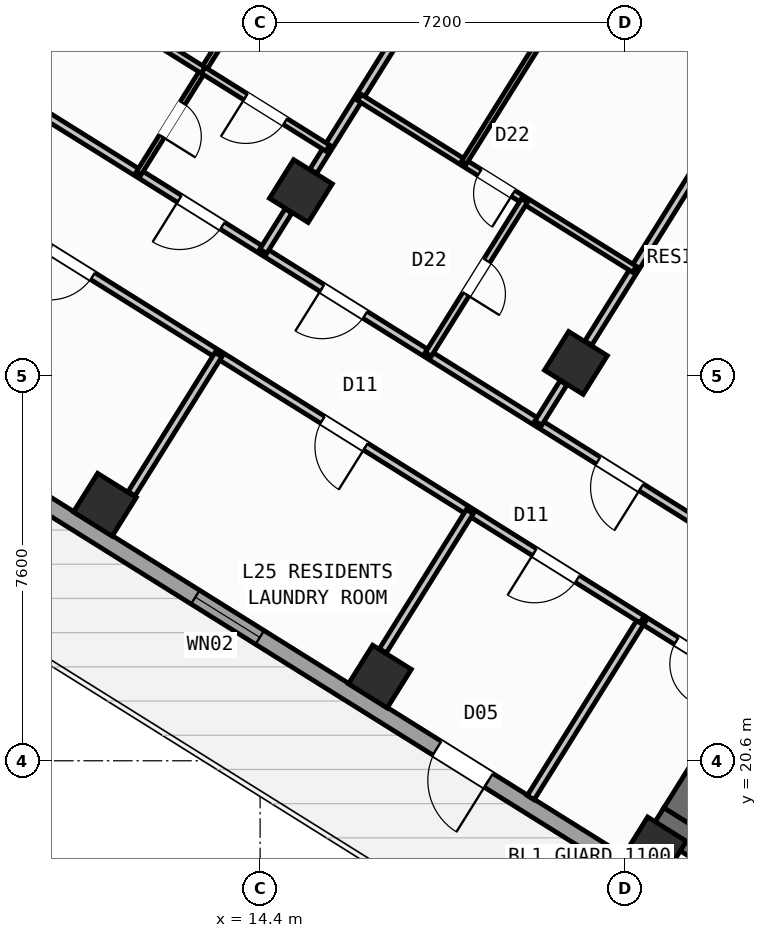
"""IFC4 building model, lengths in metres.
Left out: names, types, materials, properties, quantities, classifications, styles, units other than length and angle.
Written with IfcOpenShell. Run it as: python <this file> out.ifc"""

import sys

from ifc_helpers import new_model, si_unit, direction, frame, frame_2d, origin, origin_2d, place, context, subcontext, project, spatial, rectangle, hollow_rectangle, extrude, source, transform, mapped, element, fill, save


model = new_model("IFC4")
c1 = context("Model", 3, precision=1e-05, world=origin(), true_north=direction((0.0, 1.0)))
c2 = subcontext(c1, "Body", "Model", "MODEL_VIEW")
j1 = project(units=[si_unit("LENGTHUNIT", "METRE"), si_unit("PLANEANGLEUNIT", "RADIAN")], contexts=[c1])
p1 = place(None, origin())
s1 = spatial("IfcSite", under=j1, at=p1, CompositionType="ELEMENT")
p2 = place(p1, origin())
s2 = spatial("IfcBuilding", under=s1, at=p2, CompositionType="ELEMENT")
p3 = place(p2, frame((0.0, 0.0, 100.8)))
s3 = spatial("IfcBuildingStorey", under=s2, at=p3, CompositionType="ELEMENT", Elevation=100.8)
p4 = place(p3, frame((33.366, 12.477, 0.0), z_axis=(0.0, 0.0, 1.0), x_axis=(-0.848047359947, 0.529920442413, 0.0)))
e1 = element("IfcWall", 1, at=p4, inside=s3, PredefinedType="SHEAR", context=c2, shape_type="SweptSolid", body=[
    extrude(rectangle(XDim=13.14, YDim=0.55, at=frame_2d((6.57, 0.0))), origin(), (0.0, 0.0, 1.0), 4.25),
])
p5 = place(p3, frame((26.007, 24.976, 0.0), z_axis=(0.0, 0.0, 1.0), x_axis=(-0.529923795287, -0.848045264823, 0.0)))
e2 = element("IfcWall", 2, at=p5, inside=s3, PredefinedType="SHEAR", context=c2, shape_type="SweptSolid", body=[
    extrude(rectangle(XDim=6.425, YDim=0.55, at=frame_2d((3.212, 0.0))), origin(), (0.0, 0.0, 1.0), 4.25),
])
m1 = source(origin(), c2, "Body", "SweptSolid", [
    extrude(hollow_rectangle(XDim=0.9, YDim=0.9, WallThickness=0.036, at=origin_2d()), origin(), (0.0, 0.0, 1.0), 4.5),
])
for number, where, z_axis, x_axis in (
    (3, (22.191, 18.87, 0.0), (0.0, 0.0, 1.0), (-0.848, 0.53, 0.0)),
    (4, (20.632, 28.452, 0.0), (0.0, 0.0, 1.0), (-0.848, 0.53, 0.0)),
    (5, (16.764, 22.261, 0.0), (0.0, 0.0, 1.0), (-0.848, 0.53, 0.0)),
    (6, (15.205, 31.844, 0.0), (0.0, 0.0, 1.0), (-0.848, 0.53, 0.0)),
    (7, (11.336, 25.653, 0.0), (0.0, 0.0, 1.0), (-0.848, 0.53, 0.0)),
):
    element("IfcColumn", number, at=place(p3, frame(where, z_axis=z_axis, x_axis=x_axis)), inside=s3, PredefinedType="COLUMN", context=c2, shape_type="MappedRepresentation", body=[
        mapped(m1, transform((0.0, 0.0, 0.0), scale=1.0)),
    ])
p6 = place(p3, frame((31.76, 12.183, 0.0), z_axis=(0.0, 0.0, 1.0), x_axis=(-0.848047074256, 0.529920899612, 0.0)))
e8 = element("IfcWall", 8, at=p6, inside=s3, PredefinedType="STANDARD", context=c2, shape_type="SweptSolid", body=[
    extrude(rectangle(XDim=30.652, YDim=0.32, at=frame_2d((15.326, 0.0))), origin(), (0.0, 0.0, 1.0), 4.25),
])
p7 = place(p6, frame((15.153, 0.0, 0.0)))
e9 = element("IfcOpeningElement", 9, at=p7, cuts=e8, PredefinedType="OPENING", context=c2, shape_type="SweptSolid", body=[
    extrude(rectangle(XDim=1.2, YDim=2.15, at=frame_2d((0.6, 1.075))), frame((0.0, 0.17, 0.0), z_axis=(0.0, -1.0, 0.0), x_axis=(1.0, 0.0, 0.0)), (0.0, 0.0, 1.0), 0.34),
])
p8 = place(p6, frame((1.652, 0.0, 0.65)))
e10 = element("IfcOpeningElement", 10, at=p8, cuts=e8, PredefinedType="OPENING", context=c2, shape_type="SweptSolid", body=[
    extrude(rectangle(XDim=2.8, YDim=2.1, at=frame_2d((1.4, 1.05))), frame((0.0, 0.17, 0.0), z_axis=(0.0, -1.0, 0.0), x_axis=(1.0, 0.0, 0.0)), (0.0, 0.0, 1.0), 0.34),
])
p9 = place(p6, frame((6.856, 0.0, 0.65)))
e11 = element("IfcOpeningElement", 11, at=p9, cuts=e8, PredefinedType="OPENING", context=c2, shape_type="SweptSolid", body=[
    extrude(rectangle(XDim=2.8, YDim=2.1, at=frame_2d((1.4, 1.05))), frame((0.0, 0.17, 0.0), z_axis=(0.0, -1.0, 0.0), x_axis=(1.0, 0.0, 0.0)), (0.0, 0.0, 1.0), 0.34),
])
p10 = place(p6, frame((20.478, 0.0, 0.85)))
e12 = element("IfcOpeningElement", 12, at=p10, cuts=e8, PredefinedType="OPENING", context=c2, shape_type="SweptSolid", body=[
    extrude(rectangle(XDim=1.5, YDim=1.5, at=frame_2d((0.75, 0.75))), frame((0.0, 0.17, 0.0), z_axis=(0.0, -1.0, 0.0), x_axis=(1.0, 0.0, 0.0)), (0.0, 0.0, 1.0), 0.34),
])
p11 = place(p6, frame((26.258, 0.0, 0.65)))
e13 = element("IfcOpeningElement", 13, at=p11, cuts=e8, PredefinedType="OPENING", context=c2, shape_type="SweptSolid", body=[
    extrude(rectangle(XDim=2.8, YDim=2.1, at=frame_2d((1.4, 1.05))), frame((0.0, 0.17, 0.0), z_axis=(0.0, -1.0, 0.0), x_axis=(1.0, 0.0, 0.0)), (0.0, 0.0, 1.0), 0.34),
])
p12 = place(p3, frame((5.7, 28.71, 0.0), z_axis=(0.0, 0.0, 1.0), x_axis=(0.529923711467, 0.8480453172, 0.0)))
e14 = element("IfcWall", 14, at=p12, inside=s3, PredefinedType="STANDARD", context=c2, shape_type="SweptSolid", body=[
    extrude(rectangle(XDim=21.587, YDim=0.32, at=frame_2d((10.794, 0.0))), origin(), (0.0, 0.0, 1.0), 3.675),
])
p13 = place(p12, frame((1.629, 0.0, 0.85)))
e15 = element("IfcOpeningElement", 15, at=p13, cuts=e14, PredefinedType="OPENING", context=c2, shape_type="SweptSolid", body=[
    extrude(rectangle(XDim=1.5, YDim=1.5, at=frame_2d((0.75, 0.75))), frame((0.0, 0.17, 0.0), z_axis=(0.0, -1.0, 0.0), x_axis=(1.0, 0.0, 0.0)), (0.0, 0.0, 1.0), 0.34),
])
p14 = place(p12, frame((10.654, 0.0, 0.8)))
e16 = element("IfcOpeningElement", 16, at=p14, cuts=e14, PredefinedType="OPENING", context=c2, shape_type="SweptSolid", body=[
    extrude(rectangle(XDim=2.1, YDim=1.55, at=frame_2d((1.05, 0.775))), frame((0.0, 0.17, 0.0), z_axis=(0.0, -1.0, 0.0), x_axis=(1.0, 0.0, 0.0)), (0.0, 0.0, 1.0), 0.34),
])
p15 = place(p12, frame((17.803, 0.0, 0.85)))
e17 = element("IfcOpeningElement", 17, at=p15, cuts=e14, PredefinedType="OPENING", context=c2, shape_type="SweptSolid", body=[
    extrude(rectangle(XDim=1.5, YDim=1.5, at=frame_2d((0.75, 0.75))), frame((0.0, 0.17, 0.0), z_axis=(0.0, -1.0, 0.0), x_axis=(1.0, 0.0, 0.0)), (0.0, 0.0, 1.0), 0.34),
])
p16 = place(p3, frame((17.424, 47.083, 0.0), z_axis=(0.0, 0.0, 1.0), x_axis=(0.848049927979, -0.529916332693, 0.0)))
e18 = element("IfcWall", 18, at=p16, inside=s3, PredefinedType="STANDARD", context=c2, shape_type="SweptSolid", body=[
    extrude(rectangle(XDim=29.223, YDim=0.32, at=frame_2d((14.612, 0.0))), origin(), (0.0, 0.0, 1.0), 4.25),
])
p17 = place(p16, frame((10.072, 0.0, 0.0)))
e19 = element("IfcOpeningElement", 19, at=p17, cuts=e18, PredefinedType="OPENING", context=c2, shape_type="SweptSolid", body=[
    extrude(rectangle(XDim=1.05, YDim=2.15, at=frame_2d((0.525, 1.075))), frame((0.0, 0.17, 0.0), z_axis=(0.0, -1.0, 0.0), x_axis=(1.0, 0.0, 0.0)), (0.0, 0.0, 1.0), 0.34),
])
p18 = place(p16, frame((0.869, 0.0, 0.85)))
e20 = element("IfcOpeningElement", 20, at=p18, cuts=e18, PredefinedType="OPENING", context=c2, shape_type="SweptSolid", body=[
    extrude(rectangle(XDim=1.5, YDim=1.5, at=frame_2d((0.75, 0.75))), frame((0.0, 0.17, 0.0), z_axis=(0.0, -1.0, 0.0), x_axis=(1.0, 0.0, 0.0)), (0.0, 0.0, 1.0), 0.34),
])
p19 = place(p16, frame((3.981, 0.0, 0.85)))
e21 = element("IfcOpeningElement", 21, at=p19, cuts=e18, PredefinedType="OPENING", context=c2, shape_type="SweptSolid", body=[
    extrude(rectangle(XDim=1.5, YDim=1.5, at=frame_2d((0.75, 0.75))), frame((0.0, 0.17, 0.0), z_axis=(0.0, -1.0, 0.0), x_axis=(1.0, 0.0, 0.0)), (0.0, 0.0, 1.0), 0.34),
])
p20 = place(p16, frame((13.739, 0.0, 0.85)))
e22 = element("IfcOpeningElement", 22, at=p20, cuts=e18, PredefinedType="OPENING", context=c2, shape_type="SweptSolid", body=[
    extrude(rectangle(XDim=1.5, YDim=1.5, at=frame_2d((0.75, 0.75))), frame((0.0, 0.17, 0.0), z_axis=(0.0, -1.0, 0.0), x_axis=(1.0, 0.0, 0.0)), (0.0, 0.0, 1.0), 0.34),
])
p21 = place(p16, frame((21.114, 0.0, 0.65)))
e23 = element("IfcOpeningElement", 23, at=p21, cuts=e18, PredefinedType="OPENING", context=c2, shape_type="SweptSolid", body=[
    extrude(rectangle(XDim=2.8, YDim=2.1, at=frame_2d((1.4, 1.05))), frame((0.0, 0.17, 0.0), z_axis=(0.0, -1.0, 0.0), x_axis=(1.0, 0.0, 0.0)), (0.0, 0.0, 1.0), 0.34),
])
p22 = place(p16, frame((26.784, 0.0, 0.85)))
e24 = element("IfcOpeningElement", 24, at=p22, cuts=e18, PredefinedType="OPENING", context=c2, shape_type="SweptSolid", body=[
    extrude(rectangle(XDim=1.5, YDim=1.5, at=frame_2d((0.75, 0.75))), frame((0.0, 0.17, 0.0), z_axis=(0.0, -1.0, 0.0), x_axis=(1.0, 0.0, 0.0)), (0.0, 0.0, 1.0), 0.34),
])
p23 = place(p3, frame((23.896, 22.168, 0.0), z_axis=(0.0, 0.0, 1.0), x_axis=(-0.848075553449, 0.529875320846, 0.0)))
e25 = element("IfcWall", 25, at=p23, inside=s3, PredefinedType="PARTITIONING", context=c2, shape_type="SweptSolid", body=[
    extrude(rectangle(XDim=2.308, YDim=0.16, at=frame_2d((1.154, 0.0))), origin(), (0.0, 0.0, 1.0), 4.24),
])
p24 = place(p23, frame((0.648, 0.0, 0.0)))
e26 = element("IfcOpeningElement", 26, at=p24, cuts=e25, PredefinedType="OPENING", context=c2, shape_type="SweptSolid", body=[
    extrude(rectangle(XDim=0.86, YDim=2.05, at=frame_2d((0.43, 1.025))), frame((0.0, 0.09, 0.0), z_axis=(0.0, -1.0, 0.0), x_axis=(1.0, 0.0, 0.0)), (0.0, 0.0, 1.0), 0.18),
])
p25 = place(p3, frame((21.938, 23.391, 0.0), z_axis=(0.0, 0.0, 1.0), x_axis=(-0.529940769753, -0.848034657637, 0.0)))
e27 = element("IfcWall", 27, at=p25, inside=s3, PredefinedType="PARTITIONING", context=c2, shape_type="SweptSolid", body=[
    extrude(rectangle(XDim=4.15, YDim=0.16, at=frame_2d((2.075, 0.0))), origin(), (0.0, 0.0, 1.0), 4.24),
])
p26 = place(p3, frame((23.104, 25.256, 0.0), z_axis=(0.0, 0.0, 1.0), x_axis=(-0.848041752158, 0.529929416617, 0.0)))
e28 = element("IfcWall", 28, at=p26, inside=s3, PredefinedType="PARTITIONING", context=c2, shape_type="SweptSolid", body=[
    extrude(rectangle(XDim=16.73, YDim=0.16, at=frame_2d((8.365, 0.0))), origin(), (0.0, 0.0, 1.0), 4.24),
])
p27 = place(p26, frame((1.395, 0.0, 0.0)))
e29 = element("IfcOpeningElement", 29, at=p27, cuts=e28, PredefinedType="OPENING", context=c2, shape_type="SweptSolid", body=[
    extrude(rectangle(XDim=1.0, YDim=2.1, at=frame_2d((0.5, 1.05))), frame((0.0, 0.09, 0.0), z_axis=(0.0, -1.0, 0.0), x_axis=(1.0, 0.0, 0.0)), (0.0, 0.0, 1.0), 0.18),
])
p28 = place(p26, frame((7.82, 0.0, 0.0)))
e30 = element("IfcOpeningElement", 30, at=p28, cuts=e28, PredefinedType="OPENING", context=c2, shape_type="SweptSolid", body=[
    extrude(rectangle(XDim=1.0, YDim=2.1, at=frame_2d((0.5, 1.05))), frame((0.0, 0.09, 0.0), z_axis=(0.0, -1.0, 0.0), x_axis=(1.0, 0.0, 0.0)), (0.0, 0.0, 1.0), 0.18),
])
p29 = place(p26, frame((11.14, 0.0, 0.0)))
e31 = element("IfcOpeningElement", 31, at=p29, cuts=e28, PredefinedType="OPENING", context=c2, shape_type="SweptSolid", body=[
    extrude(rectangle(XDim=1.0, YDim=2.1, at=frame_2d((0.5, 1.05))), frame((0.0, 0.09, 0.0), z_axis=(0.0, -1.0, 0.0), x_axis=(1.0, 0.0, 0.0)), (0.0, 0.0, 1.0), 0.18),
])
p30 = place(p3, frame((21.938, 23.391, 0.0), z_axis=(0.0, 0.0, 1.0), x_axis=(-0.848045850158, 0.529922858565, 0.0)))
e32 = element("IfcWall", 32, at=p30, inside=s3, PredefinedType="PARTITIONING", context=c2, shape_type="SweptSolid", body=[
    extrude(rectangle(XDim=16.73, YDim=0.16, at=frame_2d((8.365, 0.0))), origin(), (0.0, 0.0, 1.0), 4.24),
])
p31 = place(p30, frame((1.505, 0.0, 0.0)))
e33 = element("IfcOpeningElement", 33, at=p31, cuts=e32, PredefinedType="OPENING", context=c2, shape_type="SweptSolid", body=[
    extrude(rectangle(XDim=1.0, YDim=2.1, at=frame_2d((0.5, 1.05))), frame((0.0, 0.09, 0.0), z_axis=(0.0, -1.0, 0.0), x_axis=(1.0, 0.0, 0.0)), (0.0, 0.0, 1.0), 0.18),
])
p32 = place(p30, frame((6.435, 0.0, 0.0)))
e34 = element("IfcOpeningElement", 34, at=p32, cuts=e32, PredefinedType="OPENING", context=c2, shape_type="SweptSolid", body=[
    extrude(rectangle(XDim=1.0, YDim=2.1, at=frame_2d((0.5, 1.05))), frame((0.0, 0.09, 0.0), z_axis=(0.0, -1.0, 0.0), x_axis=(1.0, 0.0, 0.0)), (0.0, 0.0, 1.0), 0.18),
])
p33 = place(p30, frame((12.784, 0.0, 0.0)))
e35 = element("IfcOpeningElement", 35, at=p33, cuts=e32, PredefinedType="OPENING", context=c2, shape_type="SweptSolid", body=[
    extrude(rectangle(XDim=1.0, YDim=2.1, at=frame_2d((0.5, 1.05))), frame((0.0, 0.09, 0.0), z_axis=(0.0, -1.0, 0.0), x_axis=(1.0, 0.0, 0.0)), (0.0, 0.0, 1.0), 0.18),
])
p34 = place(p3, frame((18.538, 25.516, 0.0), z_axis=(0.0, 0.0, 1.0), x_axis=(-0.529978607573, -0.848011011435, 0.0)))
e36 = element("IfcWall", 36, at=p34, inside=s3, PredefinedType="PARTITIONING", context=c2, shape_type="SweptSolid", body=[
    extrude(rectangle(XDim=3.238, YDim=0.16, at=frame_2d((1.619, 0.0))), origin(), (0.0, 0.0, 1.0), 3.675),
])
p35 = place(p3, frame((13.577, 28.615, 0.0), z_axis=(0.0, 0.0, 1.0), x_axis=(-0.529890499457, -0.848066069705, 0.0)))
e37 = element("IfcWall", 37, at=p35, inside=s3, PredefinedType="PARTITIONING", context=c2, shape_type="SweptSolid", body=[
    extrude(rectangle(XDim=3.238, YDim=0.16, at=frame_2d((1.619, 0.0))), origin(), (0.0, 0.0, 1.0), 4.24),
])
p36 = place(p3, frame((24.256, 34.251, 0.0), z_axis=(0.0, 0.0, 1.0), x_axis=(-0.529919772691, -0.848047778437, 0.0)))
e38 = element("IfcWall", 38, at=p36, inside=s3, PredefinedType="PARTITIONING", context=c2, shape_type="SweptSolid", body=[
    extrude(rectangle(XDim=6.376, YDim=0.16, at=frame_2d((3.188, 0.0))), origin(), (0.0, 0.0, 1.0), 3.675),
])
p37 = place(p3, frame((20.387, 28.06, 0.0), z_axis=(0.0, 0.0, 1.0), x_axis=(-0.529952145338, -0.848027548876, 0.0)))
e39 = element("IfcWall", 39, at=p37, inside=s3, PredefinedType="PARTITIONING", context=c2, shape_type="SweptSolid", body=[
    extrude(rectangle(XDim=0.938, YDim=0.16, at=frame_2d((0.469, 0.0))), origin(), (0.0, 0.0, 1.0), 3.675),
])
p38 = place(p3, frame((18.828, 37.643, 0.0), z_axis=(0.0, 0.0, 1.0), x_axis=(-0.529930102756, -0.848041323399, 0.0)))
e40 = element("IfcWall", 40, at=p38, inside=s3, PredefinedType="PARTITIONING", context=c2, shape_type="SweptSolid", body=[
    extrude(rectangle(XDim=6.376, YDim=0.16, at=frame_2d((3.188, 0.0))), origin(), (0.0, 0.0, 1.0), 3.675),
])
p39 = place(p3, frame((14.96, 31.452, 0.0), z_axis=(0.0, 0.0, 1.0), x_axis=(-0.529952145338, -0.848027548876, 0.0)))
e41 = element("IfcWall", 41, at=p39, inside=s3, PredefinedType="PARTITIONING", context=c2, shape_type="SweptSolid", body=[
    extrude(rectangle(XDim=0.938, YDim=0.16, at=frame_2d((0.469, 0.0))), origin(), (0.0, 0.0, 1.0), 3.675),
])
p40 = place(p3, frame((21.787, 30.301, 0.0), z_axis=(0.0, 0.0, 1.0), x_axis=(-0.848049732085, 0.529916646191, 0.0)))
e42 = element("IfcWall", 42, at=p40, inside=s3, PredefinedType="PLUMBINGWALL", context=c2, shape_type="SweptSolid", body=[
    extrude(rectangle(XDim=6.4, YDim=0.14, at=frame_2d((3.2, 0.0))), origin(), (0.0, 0.0, 1.0), 4.24),
])
p41 = place(p40, frame((2.824, 0.0, 0.0)))
e43 = element("IfcOpeningElement", 43, at=p41, cuts=e42, PredefinedType="OPENING", context=c2, shape_type="SweptSolid", body=[
    extrude(rectangle(XDim=0.78, YDim=2.05, at=frame_2d((0.39, 1.025))), frame((0.0, 0.08, 0.0), z_axis=(0.0, -1.0, 0.0), x_axis=(1.0, 0.0, 0.0)), (0.0, 0.0, 1.0), 0.16),
])
p42 = place(p3, frame((19.616, 31.657, 0.0), z_axis=(0.0, 0.0, 1.0), x_axis=(-0.529876336437, -0.84807491891, 0.0)))
e44 = element("IfcWall", 44, at=p42, inside=s3, PredefinedType="PLUMBINGWALL", context=c2, shape_type="SweptSolid", body=[
    extrude(rectangle(XDim=3.58, YDim=0.14, at=frame_2d((1.79, 0.0))), origin(), (0.0, 0.0, 1.0), 4.24),
])
p43 = place(p42, frame((1.4, 0.0, 0.0)))
e45 = element("IfcOpeningElement", 45, at=p43, cuts=e44, PredefinedType="OPENING", context=c2, shape_type="SweptSolid", body=[
    extrude(rectangle(XDim=0.78, YDim=2.05, at=frame_2d((0.39, 1.025))), frame((0.0, 0.08, 0.0), z_axis=(0.0, -1.0, 0.0), x_axis=(1.0, 0.0, 0.0)), (0.0, 0.0, 1.0), 0.16),
])
p44 = place(p3, frame((24.802, 42.614, 0.0), z_axis=(0.0, 0.0, 1.0), x_axis=(-0.529929676091, -0.848041590017, 0.0)))
e46 = element("IfcWall", 46, at=p44, inside=s3, PredefinedType="PARTITIONING", context=c2, shape_type="SweptSolid", body=[
    extrude(rectangle(XDim=12.04, YDim=0.11, at=frame_2d((6.02, 0.0))), origin(), (0.0, 0.0, 1.0), 4.24),
])
p45 = place(p44, frame((0.47, 0.0, 0.0)))
e47 = element("IfcOpeningElement", 47, at=p45, cuts=e46, PredefinedType="OPENING", context=c2, shape_type="SweptSolid", body=[
    extrude(rectangle(XDim=0.92, YDim=2.08, at=frame_2d((0.46, 1.04))), frame((0.0, 0.065, 0.0), z_axis=(0.0, -1.0, 0.0), x_axis=(1.0, 0.0, 0.0)), (0.0, 0.0, 1.0), 0.13),
])
p46 = place(p3, frame((20.281, 45.44, 0.0), z_axis=(0.0, 0.0, 1.0), x_axis=(-0.529917451133, -0.848049229105, 0.0)))
e48 = element("IfcWall", 48, at=p46, inside=s3, PredefinedType="PARTITIONING", context=c2, shape_type="SweptSolid", body=[
    extrude(rectangle(XDim=15.62, YDim=0.11, at=frame_2d((7.81, 0.0))), origin(), (0.0, 0.0, 1.0), 4.24),
])
p47 = place(p46, frame((13.98, 0.0, 0.0)))
e49 = element("IfcOpeningElement", 49, at=p47, cuts=e48, PredefinedType="OPENING", context=c2, shape_type="SweptSolid", body=[
    extrude(rectangle(XDim=0.78, YDim=2.05, at=frame_2d((0.39, 1.025))), frame((0.0, 0.065, 0.0), z_axis=(0.0, -1.0, 0.0), x_axis=(1.0, 0.0, 0.0)), (0.0, 0.0, 1.0), 0.13),
])
p48 = place(p46, frame((9.055, 0.0, 0.0)))
e50 = element("IfcOpeningElement", 50, at=p48, cuts=e48, PredefinedType="OPENING", context=c2, shape_type="SweptSolid", body=[
    extrude(rectangle(XDim=0.92, YDim=2.08, at=frame_2d((0.46, 1.04))), frame((0.0, 0.065, 0.0), z_axis=(0.0, -1.0, 0.0), x_axis=(1.0, 0.0, 0.0)), (0.0, 0.0, 1.0), 0.13),
])
p49 = place(p3, frame((15.734, 32.692, 0.0), z_axis=(0.0, 0.0, 1.0), x_axis=(-0.848059786386, 0.529900555496, 0.0)))
e51 = element("IfcWall", 51, at=p49, inside=s3, PredefinedType="PLUMBINGWALL", context=c2, shape_type="SweptSolid", body=[
    extrude(rectangle(XDim=2.9, YDim=0.14, at=frame_2d((1.45, 0.0))), origin(), (0.0, 0.0, 1.0), 4.24),
])
p50 = place(p49, frame((0.99, 0.0, 0.0)))
e52 = element("IfcOpeningElement", 52, at=p50, cuts=e51, PredefinedType="OPENING", context=c2, shape_type="SweptSolid", body=[
    extrude(rectangle(XDim=0.92, YDim=2.08, at=frame_2d((0.46, 1.04))), frame((0.0, 0.08, 0.0), z_axis=(0.0, -1.0, 0.0), x_axis=(1.0, 0.0, 0.0)), (0.0, 0.0, 1.0), 0.16),
])
p51 = place(p3, frame((13.275, 34.228, 0.0), z_axis=(0.0, 0.0, 1.0), x_axis=(-0.848039976902, 0.529932257535, 0.0)))
e53 = element("IfcWall", 53, at=p51, inside=s3, PredefinedType="PLUMBINGWALL", context=c2, shape_type="SweptSolid", body=[
    extrude(rectangle(XDim=3.62, YDim=0.14, at=frame_2d((1.81, 0.0))), origin(), (0.0, 0.0, 1.0), 4.24),
])
m2 = source(origin(), c2, "Body", "SweptSolid", [
    extrude(rectangle(XDim=1.2, YDim=2.15, at=frame_2d((0.6, 1.075))), frame((0.0, 0.025, 0.0), z_axis=(0.0, -1.0, 0.0), x_axis=(1.0, 0.0, 0.0)), (0.0, 0.0, 1.0), 0.05),
])
p52 = place(p7, origin())
e54 = element("IfcDoor", 54, at=p52, inside=s3, OperationType="SINGLE_SWING_LEFT", PredefinedType="DOOR", context=c2, shape_type="MappedRepresentation", body=[
    mapped(m2, transform((0.0, 0.0, 0.0), scale=1.0)),
])
fill(e9, e54)
m3 = source(origin(), c2, "Body", "SweptSolid", [
    extrude(rectangle(XDim=1.5, YDim=1.5, at=frame_2d((0.75, 0.75))), frame((0.0, 0.03, 0.0), z_axis=(0.0, -1.0, 0.0), x_axis=(1.0, 0.0, 0.0)), (0.0, 0.0, 1.0), 0.06),
])
p53 = place(p10, origin())
e55 = element("IfcWindow", 55, at=p53, inside=s3, PartitioningType="SINGLE_PANEL", PredefinedType="WINDOW", context=c2, shape_type="MappedRepresentation", body=[
    mapped(m3, transform((0.0, 0.0, 0.0), scale=1.0)),
])
fill(e12, e55)
m4 = source(origin(), c2, "Body", "SweptSolid", [
    extrude(rectangle(XDim=0.86, YDim=2.05, at=frame_2d((0.43, 1.025))), frame((0.0, 0.025, 0.0), z_axis=(0.0, -1.0, 0.0), x_axis=(1.0, 0.0, 0.0)), (0.0, 0.0, 1.0), 0.05),
])
p54 = place(p24, origin())
e56 = element("IfcDoor", 56, at=p54, inside=s3, OperationType="SINGLE_SWING_LEFT", PredefinedType="DOOR", context=c2, shape_type="MappedRepresentation", body=[
    mapped(m4, transform((0.0, 0.0, 0.0), scale=1.0)),
])
fill(e26, e56)
m5 = source(origin(), c2, "Body", "SweptSolid", [
    extrude(rectangle(XDim=1.0, YDim=2.1, at=frame_2d((0.5, 1.05))), frame((0.0, 0.025, 0.0), z_axis=(0.0, -1.0, 0.0), x_axis=(1.0, 0.0, 0.0)), (0.0, 0.0, 1.0), 0.05),
])
p55 = place(p31, origin())
e57 = element("IfcDoor", 57, at=p55, inside=s3, OperationType="SINGLE_SWING_RIGHT", PredefinedType="DOOR", context=c2, shape_type="MappedRepresentation", body=[
    mapped(m5, transform((0.0, 0.0, 0.0), scale=1.0)),
])
fill(e33, e57)
p56 = place(p32, origin())
e58 = element("IfcDoor", 58, at=p56, inside=s3, OperationType="SINGLE_SWING_LEFT", PredefinedType="DOOR", context=c2, shape_type="MappedRepresentation", body=[
    mapped(m5, transform((0.0, 0.0, 0.0), scale=1.0)),
])
fill(e34, e58)
p57 = place(p33, origin())
e59 = element("IfcDoor", 59, at=p57, inside=s3, OperationType="SINGLE_SWING_RIGHT", PredefinedType="DOOR", context=c2, shape_type="MappedRepresentation", body=[
    mapped(m5, transform((0.0, 0.0, 0.0), scale=1.0)),
])
fill(e35, e59)
p58 = place(p27, origin())
e60 = element("IfcDoor", 60, at=p58, inside=s3, OperationType="SINGLE_SWING_LEFT", PredefinedType="DOOR", context=c2, shape_type="MappedRepresentation", body=[
    mapped(m5, transform((0.0, 0.0, 0.0), scale=1.0)),
])
fill(e29, e60)
p59 = place(p28, origin())
e61 = element("IfcDoor", 61, at=p59, inside=s3, OperationType="SINGLE_SWING_RIGHT", PredefinedType="DOOR", context=c2, shape_type="MappedRepresentation", body=[
    mapped(m5, transform((0.0, 0.0, 0.0), scale=1.0)),
])
fill(e30, e61)
m6 = source(origin(), c2, "Body", "SweptSolid", [
    extrude(rectangle(XDim=0.78, YDim=2.05, at=frame_2d((0.39, 1.025))), frame((0.0, 0.025, 0.0), z_axis=(0.0, -1.0, 0.0), x_axis=(1.0, 0.0, 0.0)), (0.0, 0.0, 1.0), 0.05),
])
p60 = place(p41, origin())
e62 = element("IfcDoor", 62, at=p60, inside=s3, OperationType="SINGLE_SWING_LEFT", PredefinedType="DOOR", context=c2, shape_type="MappedRepresentation", body=[
    mapped(m6, transform((0.0, 0.0, 0.0), scale=1.0)),
])
fill(e43, e62)
p61 = place(p43, origin())
e63 = element("IfcDoor", 63, at=p61, inside=s3, OperationType="SINGLE_SWING_RIGHT", PredefinedType="DOOR", context=c2, shape_type="MappedRepresentation", body=[
    mapped(m6, transform((0.0, 0.0, 0.0), scale=1.0)),
])
fill(e45, e63)
p62 = place(p29, origin())
e64 = element("IfcDoor", 64, at=p62, inside=s3, OperationType="SINGLE_SWING_RIGHT", PredefinedType="DOOR", context=c2, shape_type="MappedRepresentation", body=[
    mapped(m5, transform((0.0, 0.0, 0.0), scale=1.0)),
])
fill(e31, e64)
m7 = source(origin(), c2, "Body", "SweptSolid", [
    extrude(rectangle(XDim=0.92, YDim=2.08, at=frame_2d((0.46, 1.04))), frame((0.0, 0.025, 0.0), z_axis=(0.0, -1.0, 0.0), x_axis=(1.0, 0.0, 0.0)), (0.0, 0.0, 1.0), 0.05),
])
p63 = place(p50, origin())
e65 = element("IfcDoor", 65, at=p63, inside=s3, OperationType="SINGLE_SWING_RIGHT", PredefinedType="DOOR", context=c2, shape_type="MappedRepresentation", body=[
    mapped(m7, transform((0.0, 0.0, 0.0), scale=1.0)),
])
fill(e52, e65)
p64 = place(p47, origin())
e66 = element("IfcDoor", 66, at=p64, inside=s3, OperationType="SINGLE_SWING_RIGHT", PredefinedType="DOOR", context=c2, shape_type="MappedRepresentation", body=[
    mapped(m6, transform((0.0, 0.0, 0.0), scale=1.0)),
])
fill(e49, e66)
save(model, sys.argv[1])
